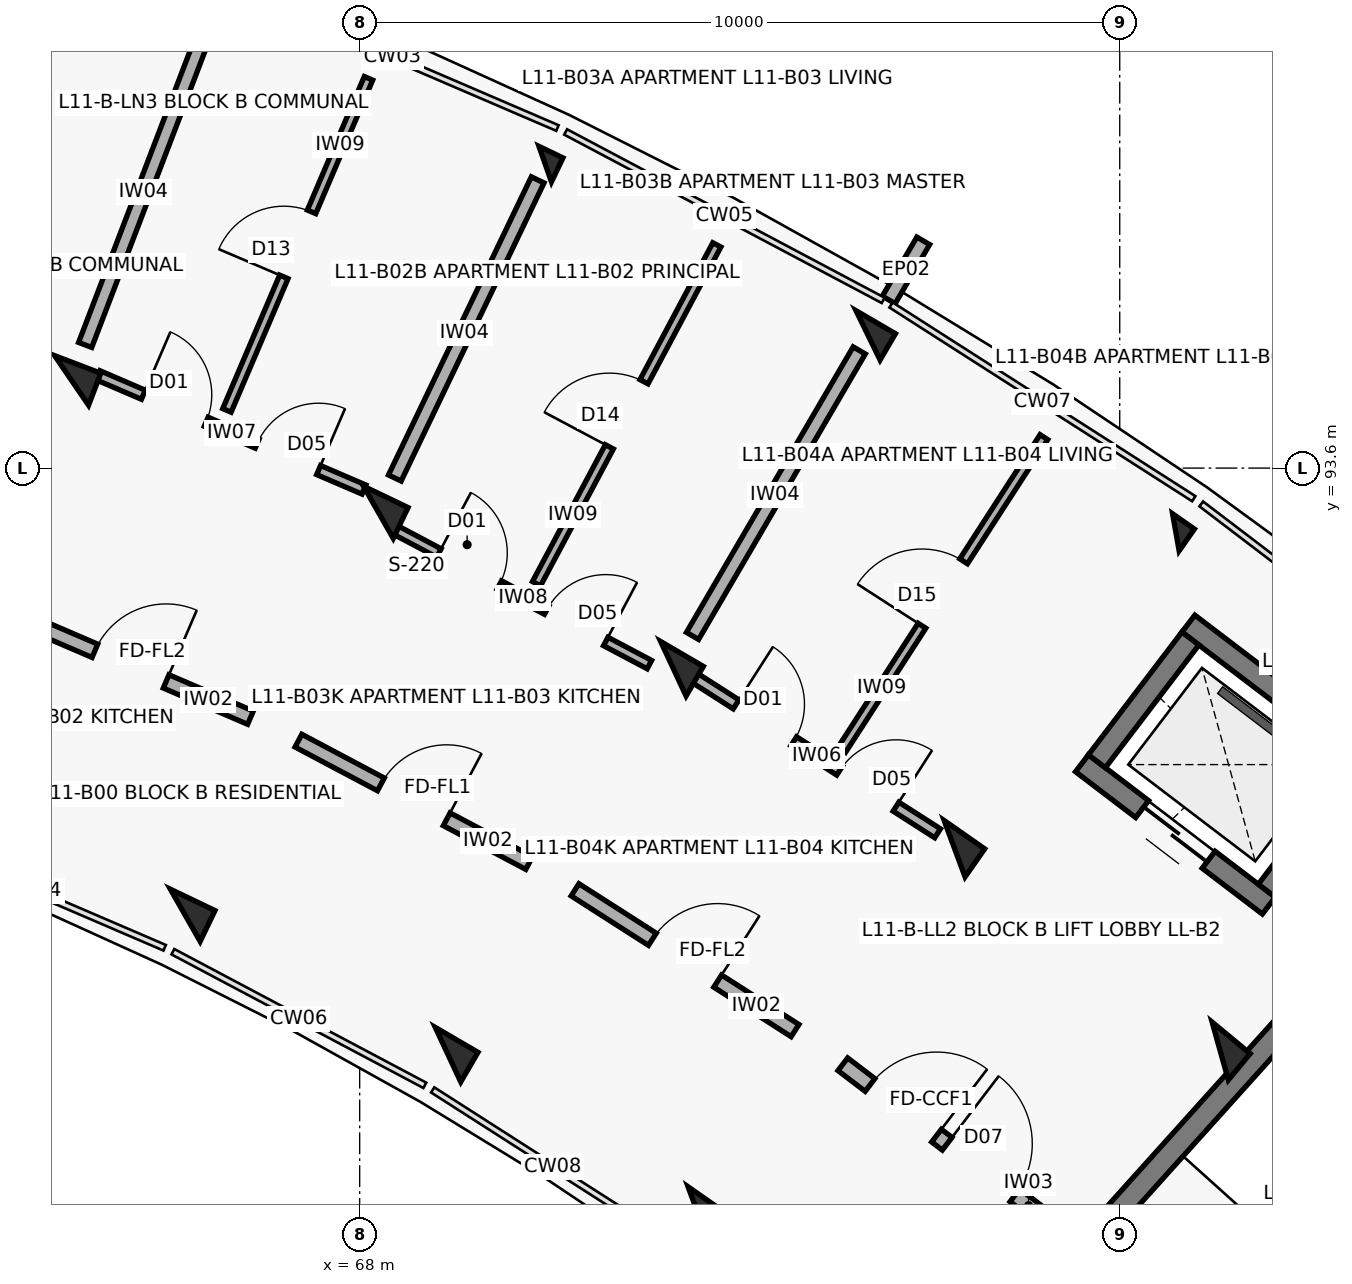
"""IFC4 building model, lengths in metres.
Left out: names, types, materials, properties, quantities, classifications, styles, units other than length and angle.
Written with IfcOpenShell. Run it as: python <this file> out.ifc"""

import sys

from ifc_helpers import new_model, si_unit, direction, frame, frame_2d, origin, origin_2d, place, context, subcontext, project, spatial, rectangle, extrude, element, fill, save


model = new_model("IFC4")
c1 = context("Model", 3, precision=1e-05, world=origin(), true_north=direction((0.0, 1.0)))
c2 = subcontext(c1, "Body", "Model", "MODEL_VIEW")
j1 = project(units=[si_unit("LENGTHUNIT", "METRE"), si_unit("PLANEANGLEUNIT", "RADIAN")], contexts=[c1])
p1 = place(None, origin())
s1 = spatial("IfcSite", under=j1, at=p1, CompositionType="ELEMENT")
p2 = place(p1, origin())
s2 = spatial("IfcBuilding", under=s1, at=p2, CompositionType="ELEMENT")
p3 = place(p2, frame((0.0, 0.0, 36.0)))
s3 = spatial("IfcBuildingStorey", under=s2, at=p3, CompositionType="ELEMENT", Elevation=36.0)
for number, where, z_axis, x_axis in (
    (1, (64.21, 94.753, 0.0), (0.0, 0.0, 1.0), (0.357, 0.934, 0.0)),
    (2, (65.706, 87.716, 0.0), (0.0, 0.0, 1.0), (0.432, 0.902, 0.0)),
    (3, (68.246, 93.019, 0.0), (0.0, 0.0, 1.0), (0.432, 0.902, 0.0)),
):
    element("IfcColumn", number, at=place(p3, frame(where, z_axis=z_axis, x_axis=x_axis)), inside=s3, PredefinedType="COLUMN", context=c2, shape_type="SweptSolid", body=[
        extrude(rectangle(XDim=0.45, YDim=0.65, at=origin_2d()), origin(), (0.0, 0.0, 1.0), 3.1),
    ])
p4 = place(p3, frame((70.441, 97.6, 0.0), z_axis=(0.0, 0.0, 1.0), x_axis=(0.432085748802, 0.901832526405, 0.0)))
e4 = element("IfcColumn", 4, at=p4, inside=s3, PredefinedType="COLUMN", context=c2, shape_type="SweptSolid", body=[
    extrude(rectangle(XDim=0.35, YDim=0.35, at=origin_2d()), origin(), (0.0, 0.0, 1.0), 3.1),
])
for number, where, z_axis, x_axis in (
    (5, (69.163, 85.882, 0.0), (0.0, 0.0, 1.0), (0.504, 0.864, 0.0)),
    (6, (72.127, 90.96, 0.0), (0.0, 0.0, 1.0), (0.504, 0.864, 0.0)),
):
    element("IfcColumn", number, at=place(p3, frame(where, z_axis=z_axis, x_axis=x_axis)), inside=s3, PredefinedType="COLUMN", context=c2, shape_type="SweptSolid", body=[
        extrude(rectangle(XDim=0.45, YDim=0.65, at=origin_2d()), origin(), (0.0, 0.0, 1.0), 3.1),
    ])
p5 = place(p3, frame((74.689, 95.347, 0.0), z_axis=(0.0, 0.0, 1.0), x_axis=(0.504226211181, 0.863571611366, 0.0)))
e7 = element("IfcColumn", 7, at=p5, inside=s3, PredefinedType="COLUMN", context=c2, shape_type="SweptSolid", body=[
    extrude(rectangle(XDim=0.4, YDim=0.6, at=origin_2d()), origin(), (0.0, 0.0, 1.0), 3.1),
])
for number, where, z_axis, x_axis in (
    (8, (72.458, 83.773, 0.0), (0.0, 0.0, 1.0), (0.573, 0.82, 0.0)),
    (9, (75.828, 88.592, 0.0), (0.0, 0.0, 1.0), (0.573, 0.82, 0.0)),
):
    element("IfcColumn", number, at=place(p3, frame(where, z_axis=z_axis, x_axis=x_axis)), inside=s3, PredefinedType="COLUMN", context=c2, shape_type="SweptSolid", body=[
        extrude(rectangle(XDim=0.45, YDim=0.65, at=origin_2d()), origin(), (0.0, 0.0, 1.0), 3.1),
    ])
p6 = place(p3, frame((78.739, 92.755, 0.0), z_axis=(0.0, 0.0, 1.0), x_axis=(0.573004420611, 0.819552276527, 0.0)))
e10 = element("IfcColumn", 10, at=p6, inside=s3, PredefinedType="COLUMN", context=c2, shape_type="SweptSolid", body=[
    extrude(rectangle(XDim=0.35, YDim=0.35, at=origin_2d()), origin(), (0.0, 0.0, 1.0), 3.1),
])
p7 = place(p3, frame((79.322, 85.93, 0.0), z_axis=(0.0, 0.0, 1.0), x_axis=(0.637961754089, 0.770068049148, 0.0)))
e11 = element("IfcColumn", 11, at=p7, inside=s3, PredefinedType="COLUMN", context=c2, shape_type="SweptSolid", body=[
    extrude(rectangle(XDim=0.45, YDim=0.65, at=origin_2d()), origin(), (0.0, 0.0, 1.0), 3.1),
])
p8 = place(p3, frame((74.961, 95.813, 0.0), z_axis=(0.0, 0.0, 1.0), x_axis=(0.504326383773, 0.863513114336, 0.0)))
e12 = element("IfcWall", 12, at=p8, inside=s3, PredefinedType="PARAPET", context=c2, shape_type="SweptSolid", body=[
    extrude(rectangle(XDim=0.9, YDim=0.195, at=frame_2d((0.45, 0.0))), origin(), (0.0, 0.0, 1.0), 2.25),
])
p9 = place(p3, frame((77.655, 83.461, 0.0), z_axis=(0.0, 0.0, 1.0), x_axis=(0.668868253964, 0.743380964808, 0.0)))
e13 = element("IfcWall", 13, at=p9, inside=s3, PredefinedType="SHEAR", context=c2, shape_type="SweptSolid", body=[
    extrude(rectangle(XDim=7.69, YDim=0.3, at=frame_2d((3.845, 0.0))), origin(), (0.0, 0.0, 1.0), 3.1),
])
p10 = place(p3, frame((79.961, 87.844, 0.0), z_axis=(0.0, 0.0, 1.0), x_axis=(-0.795464365424, 0.606000365793, 0.0)))
e14 = element("IfcWall", 14, at=p10, inside=s3, PredefinedType="SHEAR", context=c2, shape_type="SweptSolid", body=[
    extrude(rectangle(XDim=3.09, YDim=0.28, at=frame_2d((1.545, 0.0))), origin(), (0.0, 0.0, 1.0), 3.1),
])
p11 = place(p10, frame((0.995, 0.0, 0.0)))
e15 = element("IfcOpeningElement", 15, at=p11, cuts=e14, PredefinedType="OPENING", context=c2, shape_type="SweptSolid", body=[
    extrude(rectangle(XDim=1.1, YDim=2.15, at=frame_2d((0.55, 1.075))), frame((0.0, 0.15, 0.0), z_axis=(0.0, -1.0, 0.0), x_axis=(1.0, 0.0, 0.0)), (0.0, 0.0, 1.0), 0.3),
])
p12 = place(p3, frame((81.361, 89.681, 0.0), z_axis=(0.0, 0.0, 1.0), x_axis=(-0.795502452183, 0.605950368076, 0.0)))
e16 = element("IfcWall", 16, at=p12, inside=s3, PredefinedType="SHEAR", context=c2, shape_type="SweptSolid", body=[
    extrude(rectangle(XDim=3.09, YDim=0.28, at=frame_2d((1.545, 0.0))), origin(), (0.0, 0.0, 1.0), 3.1),
])
for number, where, z_axis, x_axis in (
    (17, (79.935, 88.04, 0.0), (0.0, 0.0, 1.0), (0.606, 0.795, 0.0)),
    (18, (77.699, 89.743, 0.0), (0.0, 0.0, 1.0), (0.606, 0.795, 0.0)),
):
    element("IfcWall", number, at=place(p3, frame(where, z_axis=z_axis, x_axis=x_axis)), inside=s3, PredefinedType="SHEAR", context=c2, shape_type="SweptSolid", body=[
        extrude(rectangle(XDim=2.03, YDim=0.28, at=frame_2d((1.015, 0.0))), origin(), (0.0, 0.0, 1.0), 3.1),
    ])
p13 = place(p3, frame((63.407, 91.673, 0.0), z_axis=(0.0, 0.0, 1.0), x_axis=(0.918718172399, -0.394913813008, 0.0)))
e19 = element("IfcWall", 19, at=p13, inside=s3, PredefinedType="SOLIDWALL", context=c2, shape_type="SweptSolid", body=[
    extrude(rectangle(XDim=3.436, YDim=0.19, at=frame_2d((1.718, 0.0))), origin(), (0.0, 0.0, 1.0), 2.14),
])
p14 = place(p13, frame((1.208, 0.0, 0.0)))
e20 = element("IfcOpeningElement", 20, at=p14, cuts=e19, PredefinedType="OPENING", context=c2, shape_type="SweptSolid", body=[
    extrude(rectangle(XDim=1.02, YDim=2.15, at=frame_2d((0.51, 1.075))), frame((0.0, 0.105, 0.0), z_axis=(0.0, -1.0, 0.0), x_axis=(1.0, 0.0, 0.0)), (0.0, 0.0, 1.0), 0.21),
])
p15 = place(p3, frame((64.557, 94.822, 0.0), z_axis=(0.0, 0.0, 1.0), x_axis=(0.918726854017, -0.394893615684, 0.0)))
e21 = element("IfcWall", 21, at=p15, inside=s3, PredefinedType="PARTITIONING", context=c2, shape_type="SweptSolid", body=[
    extrude(rectangle(XDim=3.81, YDim=0.13, at=frame_2d((1.905, 0.0))), origin(), (0.0, 0.0, 1.0), 2.14),
])
p16 = place(p15, frame((0.65, 0.0, 0.0)))
e22 = element("IfcOpeningElement", 22, at=p16, cuts=e21, PredefinedType="OPENING", context=c2, shape_type="SweptSolid", body=[
    extrude(rectangle(XDim=0.9, YDim=2.1, at=frame_2d((0.45, 1.05))), frame((0.0, 0.075, 0.0), z_axis=(0.0, -1.0, 0.0), x_axis=(1.0, 0.0, 0.0)), (0.0, 0.0, 1.0), 0.15),
])
p17 = place(p15, frame((2.28, 0.0, 0.0)))
e23 = element("IfcOpeningElement", 23, at=p17, cuts=e21, PredefinedType="OPENING", context=c2, shape_type="SweptSolid", body=[
    extrude(rectangle(XDim=0.88, YDim=2.1, at=frame_2d((0.44, 1.05))), frame((0.0, 0.075, 0.0), z_axis=(0.0, -1.0, 0.0), x_axis=(1.0, 0.0, 0.0)), (0.0, 0.0, 1.0), 0.15),
])
p18 = place(p3, frame((66.253, 94.359, 0.0), z_axis=(0.0, 0.0, 1.0), x_axis=(0.392156908456, 0.919898341748, 0.0)))
e24 = element("IfcWall", 24, at=p18, inside=s3, PredefinedType="PARTITIONING", context=c2, shape_type="SweptSolid", body=[
    extrude(rectangle(XDim=4.75, YDim=0.12, at=frame_2d((2.375, 0.0))), origin(), (0.0, 0.0, 1.0), 2.14),
])
p19 = place(p18, frame((1.91, 0.0, 0.0)))
e25 = element("IfcOpeningElement", 25, at=p19, cuts=e24, PredefinedType="OPENING", context=c2, shape_type="SweptSolid", body=[
    extrude(rectangle(XDim=0.93, YDim=2.1, at=frame_2d((0.465, 1.05))), frame((0.0, 0.07, 0.0), z_axis=(0.0, -1.0, 0.0), x_axis=(1.0, 0.0, 0.0)), (0.0, 0.0, 1.0), 0.14),
])
p20 = place(p3, frame((64.389, 95.22, 0.0), z_axis=(0.0, 0.0, 1.0), x_axis=(0.357064016205, 0.934079915388, 0.0)))
e26 = element("IfcWall", 26, at=p20, inside=s3, PredefinedType="SOLIDWALL", context=c2, shape_type="SweptSolid", body=[
    extrude(rectangle(XDim=4.35, YDim=0.185, at=frame_2d((2.175, 0.0))), origin(), (0.0, 0.0, 1.0), 2.14),
])
p21 = place(p3, frame((67.194, 90.014, 0.0), z_axis=(0.0, 0.0, 1.0), x_axis=(0.883410853063, -0.468599258099, 0.0)))
e27 = element("IfcWall", 27, at=p21, inside=s3, PredefinedType="SOLIDWALL", context=c2, shape_type="SweptSolid", body=[
    extrude(rectangle(XDim=3.436, YDim=0.19, at=frame_2d((1.718, 0.0))), origin(), (0.0, 0.0, 1.0), 2.14),
])
p22 = place(p21, frame((1.228, 0.0, 0.0)))
e28 = element("IfcOpeningElement", 28, at=p22, cuts=e27, PredefinedType="OPENING", context=c2, shape_type="SweptSolid", body=[
    extrude(rectangle(XDim=0.98, YDim=2.15, at=frame_2d((0.49, 1.075))), frame((0.0, 0.105, 0.0), z_axis=(0.0, -1.0, 0.0), x_axis=(1.0, 0.0, 0.0)), (0.0, 0.0, 1.0), 0.21),
])
p23 = place(p3, frame((68.468, 92.788, 0.0), z_axis=(0.0, 0.0, 1.0), x_axis=(0.883450371448, -0.468524749814, 0.0)))
e29 = element("IfcWall", 29, at=p23, inside=s3, PredefinedType="PARTITIONING", context=c2, shape_type="SweptSolid", body=[
    extrude(rectangle(XDim=3.785, YDim=0.125, at=frame_2d((1.893, 0.0))), origin(), (0.0, 0.0, 1.0), 2.14),
])
p24 = place(p23, frame((0.65, 0.0, 0.0)))
e30 = element("IfcOpeningElement", 30, at=p24, cuts=e29, PredefinedType="OPENING", context=c2, shape_type="SweptSolid", body=[
    extrude(rectangle(XDim=0.9, YDim=2.1, at=frame_2d((0.45, 1.05))), frame((0.0, 0.073, 0.0), z_axis=(0.0, -1.0, 0.0), x_axis=(1.0, 0.0, 0.0)), (0.0, 0.0, 1.0), 0.145),
])
p25 = place(p23, frame((2.255, 0.0, 0.0)))
e31 = element("IfcOpeningElement", 31, at=p25, cuts=e29, PredefinedType="OPENING", context=c2, shape_type="SweptSolid", body=[
    extrude(rectangle(XDim=0.88, YDim=2.1, at=frame_2d((0.44, 1.05))), frame((0.0, 0.073, 0.0), z_axis=(0.0, -1.0, 0.0), x_axis=(1.0, 0.0, 0.0)), (0.0, 0.0, 1.0), 0.145),
])
p26 = place(p3, frame((70.326, 92.079, 0.0), z_axis=(0.0, 0.0, 1.0), x_axis=(0.469847866249, 0.882747405876, 0.0)))
e32 = element("IfcWall", 32, at=p26, inside=s3, PredefinedType="PARTITIONING", context=c2, shape_type="SweptSolid", body=[
    extrude(rectangle(XDim=5.05, YDim=0.12, at=frame_2d((2.525, 0.0))), origin(), (0.0, 0.0, 1.0), 2.14),
])
p27 = place(p26, frame((2.04, 0.0, 0.0)))
e33 = element("IfcOpeningElement", 33, at=p27, cuts=e32, PredefinedType="OPENING", context=c2, shape_type="SweptSolid", body=[
    extrude(rectangle(XDim=0.97, YDim=2.1, at=frame_2d((0.485, 1.05))), frame((0.0, 0.07, 0.0), z_axis=(0.0, -1.0, 0.0), x_axis=(1.0, 0.0, 0.0)), (0.0, 0.0, 1.0), 0.14),
])
p28 = place(p3, frame((68.462, 93.469, 0.0), z_axis=(0.0, 0.0, 1.0), x_axis=(0.432086898897, 0.901831975371, 0.0)))
e34 = element("IfcWall", 34, at=p28, inside=s3, PredefinedType="SOLIDWALL", context=c2, shape_type="SweptSolid", body=[
    extrude(rectangle(XDim=4.35, YDim=0.185, at=frame_2d((2.175, 0.0))), origin(), (0.0, 0.0, 1.0), 2.14),
])
p29 = place(p3, frame((70.834, 88.051, 0.0), z_axis=(0.0, 0.0, 1.0), x_axis=(0.842257205985, -0.539075874963, 0.0)))
e35 = element("IfcWall", 35, at=p29, inside=s3, PredefinedType="SOLIDWALL", context=c2, shape_type="SweptSolid", body=[
    extrude(rectangle(XDim=3.436, YDim=0.19, at=frame_2d((1.718, 0.0))), origin(), (0.0, 0.0, 1.0), 2.14),
])
p30 = place(p29, frame((1.208, 0.0, 0.0)))
e36 = element("IfcOpeningElement", 36, at=p30, cuts=e35, PredefinedType="OPENING", context=c2, shape_type="SweptSolid", body=[
    extrude(rectangle(XDim=1.02, YDim=2.15, at=frame_2d((0.51, 1.075))), frame((0.0, 0.105, 0.0), z_axis=(0.0, -1.0, 0.0), x_axis=(1.0, 0.0, 0.0)), (0.0, 0.0, 1.0), 0.21),
])
p31 = place(p3, frame((72.405, 90.842, 0.0), z_axis=(0.0, 0.0, 1.0), x_axis=(0.842271400662, -0.539053696423, 0.0)))
e37 = element("IfcWall", 37, at=p31, inside=s3, PredefinedType="PARTITIONING", context=c2, shape_type="SweptSolid", body=[
    extrude(rectangle(XDim=3.797, YDim=0.14, at=frame_2d((1.898, 0.0))), origin(), (0.0, 0.0, 1.0), 2.14),
])
p32 = place(p31, frame((0.65, 0.0, 0.0)))
e38 = element("IfcOpeningElement", 38, at=p32, cuts=e37, PredefinedType="OPENING", context=c2, shape_type="SweptSolid", body=[
    extrude(rectangle(XDim=0.9, YDim=2.1, at=frame_2d((0.45, 1.05))), frame((0.0, 0.08, 0.0), z_axis=(0.0, -1.0, 0.0), x_axis=(1.0, 0.0, 0.0)), (0.0, 0.0, 1.0), 0.16),
])
p33 = place(p31, frame((2.267, 0.0, 0.0)))
e39 = element("IfcOpeningElement", 39, at=p33, cuts=e37, PredefinedType="OPENING", context=c2, shape_type="SweptSolid", body=[
    extrude(rectangle(XDim=0.88, YDim=2.1, at=frame_2d((0.44, 1.05))), frame((0.0, 0.08, 0.0), z_axis=(0.0, -1.0, 0.0), x_axis=(1.0, 0.0, 0.0)), (0.0, 0.0, 1.0), 0.16),
])
p34 = place(p3, frame((74.342, 89.892, 0.0), z_axis=(0.0, 0.0, 1.0), x_axis=(0.542871109654, 0.839816026462, 0.0)))
e40 = element("IfcWall", 40, at=p34, inside=s3, PredefinedType="PARTITIONING", context=c2, shape_type="SweptSolid", body=[
    extrude(rectangle(XDim=4.9, YDim=0.12, at=frame_2d((2.45, 0.0))), origin(), (0.0, 0.0, 1.0), 2.14),
])
p35 = place(p34, frame((1.945, 0.0, 0.0)))
e41 = element("IfcOpeningElement", 41, at=p35, cuts=e40, PredefinedType="OPENING", context=c2, shape_type="SweptSolid", body=[
    extrude(rectangle(XDim=1.01, YDim=2.1, at=frame_2d((0.505, 1.05))), frame((0.0, 0.07, 0.0), z_axis=(0.0, -1.0, 0.0), x_axis=(1.0, 0.0, 0.0)), (0.0, 0.0, 1.0), 0.14),
])
p36 = place(p3, frame((72.379, 91.392, 0.0), z_axis=(0.0, 0.0, 1.0), x_axis=(0.504216452091, 0.863577309475, 0.0)))
e42 = element("IfcWall", 42, at=p36, inside=s3, PredefinedType="SOLIDWALL", context=c2, shape_type="SweptSolid", body=[
    extrude(rectangle(XDim=4.35, YDim=0.185, at=frame_2d((2.175, 0.0))), origin(), (0.0, 0.0, 1.0), 2.14),
])
p37 = place(p3, frame((74.357, 85.756, 0.0), z_axis=(0.0, 0.0, 1.0), x_axis=(0.795498026433, -0.605956178235, 0.0)))
e43 = element("IfcWall", 43, at=p37, inside=s3, PredefinedType="SOLIDWALL", context=c2, shape_type="SweptSolid", body=[
    extrude(rectangle(XDim=3.296, YDim=0.21, at=frame_2d((1.648, 0.0))), origin(), (0.0, 0.0, 1.0), 2.14),
])
p38 = place(p37, frame((0.45, 0.0, 0.0)))
e44 = element("IfcOpeningElement", 44, at=p38, cuts=e43, PredefinedType="OPENING", context=c2, shape_type="SweptSolid", body=[
    extrude(rectangle(XDim=1.1, YDim=2.15, at=frame_2d((0.55, 1.075))), frame((0.0, 0.115, 0.0), z_axis=(0.0, -1.0, 0.0), x_axis=(1.0, 0.0, 0.0)), (0.0, 0.0, 1.0), 0.23),
])
p39 = place(p37, frame((1.726, 0.0, 0.0)))
e45 = element("IfcOpeningElement", 45, at=p39, cuts=e43, PredefinedType="OPENING", context=c2, shape_type="SweptSolid", body=[
    extrude(rectangle(XDim=1.12, YDim=2.15, at=frame_2d((0.56, 1.075))), frame((0.0, 0.115, 0.0), z_axis=(0.0, -1.0, 0.0), x_axis=(1.0, 0.0, 0.0)), (0.0, 0.0, 1.0), 0.23),
])
p40 = place(p11, origin())
e46 = element("IfcDoor", 46, at=p40, inside=s3, OperationType="DOUBLE_DOOR_SLIDING", PredefinedType="DOOR", context=c2, shape_type="SweptSolid", body=[
    extrude(rectangle(XDim=1.1, YDim=2.15, at=frame_2d((0.55, 1.075))), frame((0.0, 0.025, 0.0), z_axis=(0.0, -1.0, 0.0), x_axis=(1.0, 0.0, 0.0)), (0.0, 0.0, 1.0), 0.05),
])
fill(e15, e46)
p41 = place(p14, origin())
e47 = element("IfcDoor", 47, at=p41, inside=s3, OperationType="SINGLE_SWING_RIGHT", PredefinedType="DOOR", context=c2, shape_type="SweptSolid", body=[
    extrude(rectangle(XDim=1.02, YDim=2.15, at=frame_2d((0.51, 1.075))), frame((0.0, 0.025, 0.0), z_axis=(0.0, -1.0, 0.0), x_axis=(1.0, 0.0, 0.0)), (0.0, 0.0, 1.0), 0.05),
])
fill(e20, e47)
p42 = place(p16, origin())
e48 = element("IfcDoor", 48, at=p42, inside=s3, OperationType="SINGLE_SWING_LEFT", PredefinedType="DOOR", context=c2, shape_type="SweptSolid", body=[
    extrude(rectangle(XDim=0.9, YDim=2.1, at=frame_2d((0.45, 1.05))), frame((0.0, 0.025, 0.0), z_axis=(0.0, -1.0, 0.0), x_axis=(1.0, 0.0, 0.0)), (0.0, 0.0, 1.0), 0.05),
])
fill(e22, e48)
p43 = place(p17, origin())
e49 = element("IfcDoor", 49, at=p43, inside=s3, OperationType="SINGLE_SWING_RIGHT", PredefinedType="DOOR", context=c2, shape_type="SweptSolid", body=[
    extrude(rectangle(XDim=0.88, YDim=2.1, at=frame_2d((0.44, 1.05))), frame((0.0, 0.025, 0.0), z_axis=(0.0, -1.0, 0.0), x_axis=(1.0, 0.0, 0.0)), (0.0, 0.0, 1.0), 0.05),
])
fill(e23, e49)
p44 = place(p19, origin())
e50 = element("IfcDoor", 50, at=p44, inside=s3, OperationType="SINGLE_SWING_LEFT", PredefinedType="DOOR", context=c2, shape_type="SweptSolid", body=[
    extrude(rectangle(XDim=0.93, YDim=2.1, at=frame_2d((0.465, 1.05))), frame((0.0, 0.025, 0.0), z_axis=(0.0, -1.0, 0.0), x_axis=(1.0, 0.0, 0.0)), (0.0, 0.0, 1.0), 0.05),
])
fill(e25, e50)
p45 = place(p22, origin())
e51 = element("IfcDoor", 51, at=p45, inside=s3, OperationType="SINGLE_SWING_RIGHT", PredefinedType="DOOR", context=c2, shape_type="SweptSolid", body=[
    extrude(rectangle(XDim=0.98, YDim=2.15, at=frame_2d((0.49, 1.075))), frame((0.0, 0.025, 0.0), z_axis=(0.0, -1.0, 0.0), x_axis=(1.0, 0.0, 0.0)), (0.0, 0.0, 1.0), 0.05),
])
fill(e28, e51)
p46 = place(p24, origin())
e52 = element("IfcDoor", 52, at=p46, inside=s3, OperationType="SINGLE_SWING_LEFT", PredefinedType="DOOR", context=c2, shape_type="SweptSolid", body=[
    extrude(rectangle(XDim=0.9, YDim=2.1, at=frame_2d((0.45, 1.05))), frame((0.0, 0.025, 0.0), z_axis=(0.0, -1.0, 0.0), x_axis=(1.0, 0.0, 0.0)), (0.0, 0.0, 1.0), 0.05),
])
fill(e30, e52)
p47 = place(p25, origin())
e53 = element("IfcDoor", 53, at=p47, inside=s3, OperationType="SINGLE_SWING_RIGHT", PredefinedType="DOOR", context=c2, shape_type="SweptSolid", body=[
    extrude(rectangle(XDim=0.88, YDim=2.1, at=frame_2d((0.44, 1.05))), frame((0.0, 0.025, 0.0), z_axis=(0.0, -1.0, 0.0), x_axis=(1.0, 0.0, 0.0)), (0.0, 0.0, 1.0), 0.05),
])
fill(e31, e53)
p48 = place(p27, origin())
e54 = element("IfcDoor", 54, at=p48, inside=s3, OperationType="SINGLE_SWING_LEFT", PredefinedType="DOOR", context=c2, shape_type="SweptSolid", body=[
    extrude(rectangle(XDim=0.97, YDim=2.1, at=frame_2d((0.485, 1.05))), frame((0.0, 0.025, 0.0), z_axis=(0.0, -1.0, 0.0), x_axis=(1.0, 0.0, 0.0)), (0.0, 0.0, 1.0), 0.05),
])
fill(e33, e54)
p49 = place(p30, origin())
e55 = element("IfcDoor", 55, at=p49, inside=s3, OperationType="SINGLE_SWING_RIGHT", PredefinedType="DOOR", context=c2, shape_type="SweptSolid", body=[
    extrude(rectangle(XDim=1.02, YDim=2.15, at=frame_2d((0.51, 1.075))), frame((0.0, 0.025, 0.0), z_axis=(0.0, -1.0, 0.0), x_axis=(1.0, 0.0, 0.0)), (0.0, 0.0, 1.0), 0.05),
])
fill(e36, e55)
p50 = place(p32, origin())
e56 = element("IfcDoor", 56, at=p50, inside=s3, OperationType="SINGLE_SWING_LEFT", PredefinedType="DOOR", context=c2, shape_type="SweptSolid", body=[
    extrude(rectangle(XDim=0.9, YDim=2.1, at=frame_2d((0.45, 1.05))), frame((0.0, 0.025, 0.0), z_axis=(0.0, -1.0, 0.0), x_axis=(1.0, 0.0, 0.0)), (0.0, 0.0, 1.0), 0.05),
])
fill(e38, e56)
p51 = place(p33, origin())
e57 = element("IfcDoor", 57, at=p51, inside=s3, OperationType="SINGLE_SWING_RIGHT", PredefinedType="DOOR", context=c2, shape_type="SweptSolid", body=[
    extrude(rectangle(XDim=0.88, YDim=2.1, at=frame_2d((0.44, 1.05))), frame((0.0, 0.025, 0.0), z_axis=(0.0, -1.0, 0.0), x_axis=(1.0, 0.0, 0.0)), (0.0, 0.0, 1.0), 0.05),
])
fill(e39, e57)
p52 = place(p35, origin())
e58 = element("IfcDoor", 58, at=p52, inside=s3, OperationType="SINGLE_SWING_LEFT", PredefinedType="DOOR", context=c2, shape_type="SweptSolid", body=[
    extrude(rectangle(XDim=1.01, YDim=2.1, at=frame_2d((0.505, 1.05))), frame((0.0, 0.025, 0.0), z_axis=(0.0, -1.0, 0.0), x_axis=(1.0, 0.0, 0.0)), (0.0, 0.0, 1.0), 0.05),
])
fill(e41, e58)
p53 = place(p38, origin())
e59 = element("IfcDoor", 59, at=p53, inside=s3, OperationType="SINGLE_SWING_RIGHT", PredefinedType="DOOR", context=c2, shape_type="SweptSolid", body=[
    extrude(rectangle(XDim=1.1, YDim=2.15, at=frame_2d((0.55, 1.075))), frame((0.0, 0.025, 0.0), z_axis=(0.0, -1.0, 0.0), x_axis=(1.0, 0.0, 0.0)), (0.0, 0.0, 1.0), 0.05),
])
fill(e44, e59)
p54 = place(p39, origin())
e60 = element("IfcDoor", 60, at=p54, inside=s3, OperationType="SINGLE_SWING_LEFT", PredefinedType="DOOR", context=c2, shape_type="SweptSolid", body=[
    extrude(rectangle(XDim=1.12, YDim=2.15, at=frame_2d((0.56, 1.075))), frame((0.0, 0.025, 0.0), z_axis=(0.0, -1.0, 0.0), x_axis=(1.0, 0.0, 0.0)), (0.0, 0.0, 1.0), 0.05),
])
fill(e45, e60)
save(model, sys.argv[1])
